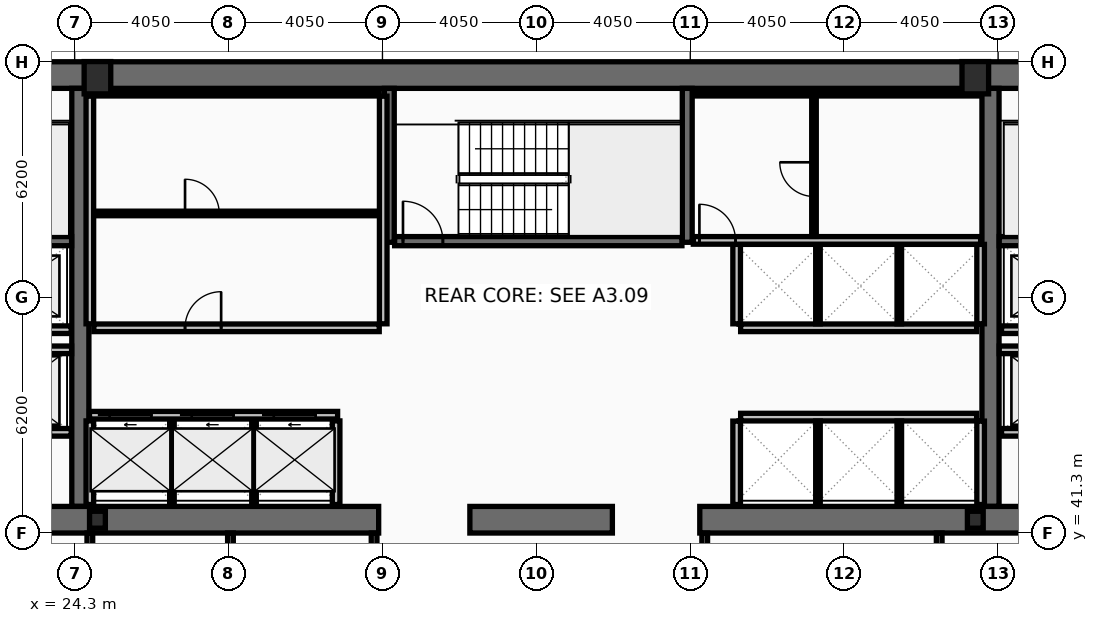
"""IFC4 building model, lengths in metres.
Left out: names, types, materials, properties, quantities, classifications, styles, units other than length and angle.
Written with IfcOpenShell. Run it as: python <this file> out.ifc"""

import sys

from ifc_helpers import new_model, si_unit, direction, frame, frame_2d, origin, origin_2d, place, context, subcontext, project, spatial, rectangle, hollow_rectangle, i_section, extrude, element, fill, save


model = new_model("IFC4")
c1 = context("Model", 3, precision=1e-05, world=origin(), true_north=direction((0.0, 1.0)))
c2 = subcontext(c1, "Body", "Model", "MODEL_VIEW")
j1 = project(units=[si_unit("LENGTHUNIT", "METRE"), si_unit("PLANEANGLEUNIT", "RADIAN")], contexts=[c1])
p1 = place(None, origin())
s1 = spatial("IfcSite", under=j1, at=p1, CompositionType="ELEMENT")
p2 = place(p1, origin())
s2 = spatial("IfcBuilding", under=s1, at=p2, CompositionType="ELEMENT")
p3 = place(p2, frame((0.0, 0.0, 132.6)))
s3 = spatial("IfcBuildingStorey", under=s2, at=p3, CompositionType="ELEMENT", Elevation=132.6)
p4 = place(p3, frame((16.2, 53.35, 0.0), z_axis=(0.0, 0.0, 1.0), x_axis=(1.0, 0.0, 0.0)))
e1 = element("IfcWall", 1, at=p4, inside=s3, PredefinedType="SHEAR", context=c2, shape_type="SweptSolid", body=[
    extrude(rectangle(XDim=40.5, YDim=0.7, at=frame_2d((20.25, 0.0))), origin(), (0.0, 0.0, 1.0), 3.44),
])
for number, where, z_axis, x_axis in (
    (2, (24.45, 42.0, 0.0), (0.0, 0.0, 1.0), (0.0, 1.0, 0.0)),
    (3, (48.4, 42.0, 0.0), (0.0, 0.0, 1.0), (0.0, 1.0, 0.0)),
):
    element("IfcWall", number, at=place(p3, frame(where, z_axis=z_axis, x_axis=x_axis)), inside=s3, PredefinedType="SHEAR", context=c2, shape_type="SweptSolid", body=[
        extrude(rectangle(XDim=11.0, YDim=0.45, at=frame_2d((5.5, 0.0))), origin(), (0.0, 0.0, 1.0), 3.44),
    ])
p5 = place(p3, frame((32.3, 41.65, 0.0), z_axis=(0.0, 0.0, 1.0), x_axis=(-1.0, 0.0, 0.0)))
e4 = element("IfcWall", 4, at=p5, inside=s3, PredefinedType="SHEAR", context=c2, shape_type="SweptSolid", body=[
    extrude(rectangle(XDim=11.45, YDim=0.7, at=frame_2d((5.725, 0.0))), origin(), (0.0, 0.0, 1.0), 3.44),
])
p6 = place(p3, frame((38.45, 41.65, 0.0), z_axis=(0.0, 0.0, 1.0), x_axis=(-1.0, 0.0, 0.0)))
e5 = element("IfcWall", 5, at=p6, inside=s3, PredefinedType="SHEAR", context=c2, shape_type="SweptSolid", body=[
    extrude(rectangle(XDim=3.75, YDim=0.7, at=frame_2d((1.875, 0.0))), origin(), (0.0, 0.0, 1.0), 3.44),
])
p7 = place(p3, frame((52.05, 41.65, 0.0), z_axis=(0.0, 0.0, 1.0), x_axis=(-1.0, 0.0, 0.0)))
e6 = element("IfcWall", 6, at=p7, inside=s3, PredefinedType="SHEAR", context=c2, shape_type="SweptSolid", body=[
    extrude(rectangle(XDim=11.3, YDim=0.7, at=frame_2d((5.65, 0.0))), origin(), (0.0, 0.0, 1.0), 3.44),
])
for number, where, z_axis, x_axis in (
    (7, (32.58, 48.95, 0.0), (0.0, 0.0, 1.0), (0.0, 1.0, 0.0)),
    (8, (40.42, 48.95, 0.0), (0.0, 0.0, 1.0), (0.0, 1.0, 0.0)),
):
    element("IfcWall", number, at=place(p3, frame(where, z_axis=z_axis, x_axis=x_axis)), inside=s3, PredefinedType="SHEAR", context=c2, shape_type="SweptSolid", body=[
        extrude(rectangle(XDim=4.05, YDim=0.26, at=frame_2d((2.025, 0.0))), origin(), (0.0, 0.0, 1.0), 3.44),
    ])
p8 = place(p3, frame((16.9, 48.98, 0.0), z_axis=(0.0, 0.0, 1.0), x_axis=(1.0, 0.0, 0.0)))
e9 = element("IfcWall", 9, at=p8, inside=s3, PredefinedType="SHEAR", context=c2, shape_type="SweptSolid", body=[
    extrude(rectangle(XDim=7.32, YDim=0.24, at=frame_2d((3.66, 0.0))), origin(), (0.0, 0.0, 1.0), 3.44),
])
p9 = place(p8, frame((0.22, 0.0, 0.0)))
e10 = element("IfcOpeningElement", 10, at=p9, cuts=e9, PredefinedType="OPENING", context=c2, shape_type="SweptSolid", body=[
    extrude(rectangle(XDim=1.05, YDim=2.15, at=frame_2d((0.525, 1.075))), frame((0.0, 0.13, 0.0), z_axis=(0.0, -1.0, 0.0), x_axis=(1.0, 0.0, 0.0)), (0.0, 0.0, 1.0), 0.26),
])
p10 = place(p3, frame((48.63, 48.98, 0.0), z_axis=(0.0, 0.0, 1.0), x_axis=(1.0, 0.0, 0.0)))
e11 = element("IfcWall", 11, at=p10, inside=s3, PredefinedType="SHEAR", context=c2, shape_type="SweptSolid", body=[
    extrude(rectangle(XDim=7.37, YDim=0.24, at=frame_2d((3.685, 0.0))), origin(), (0.0, 0.0, 1.0), 3.44),
])
p11 = place(p10, frame((6.1, 0.0, 0.0)))
e12 = element("IfcOpeningElement", 12, at=p11, cuts=e11, PredefinedType="OPENING", context=c2, shape_type="SweptSolid", body=[
    extrude(rectangle(XDim=1.05, YDim=2.15, at=frame_2d((0.525, 1.075))), frame((0.0, 0.13, 0.0), z_axis=(0.0, -1.0, 0.0), x_axis=(1.0, 0.0, 0.0)), (0.0, 0.0, 1.0), 0.26),
])
p12 = place(p3, frame((32.72, 48.98, 0.0), z_axis=(0.0, 0.0, 1.0), x_axis=(1.0, 0.0, 0.0)))
e13 = element("IfcWall", 13, at=p12, inside=s3, PredefinedType="SHEAR", context=c2, shape_type="SweptSolid", body=[
    extrude(rectangle(XDim=7.56, YDim=0.24, at=frame_2d((3.78, 0.0))), origin(), (0.0, 0.0, 1.0), 3.44),
])
p13 = place(p12, frame((0.22, 0.0, 0.0)))
e14 = element("IfcOpeningElement", 14, at=p13, cuts=e13, PredefinedType="OPENING", context=c2, shape_type="SweptSolid", body=[
    extrude(rectangle(XDim=1.05, YDim=2.15, at=frame_2d((0.525, 1.075))), frame((0.0, 0.13, 0.0), z_axis=(0.0, -1.0, 0.0), x_axis=(1.0, 0.0, 0.0)), (0.0, 0.0, 1.0), 0.26),
])
for number, where, z_axis, x_axis in (
    (15, (24.9, 53.28, 0.0), (0.0, 0.0, 1.0), (1.0, 0.0, 0.0)),
    (16, (48.0, 53.28, 0.0), (0.0, 0.0, 1.0), (1.0, 0.0, 0.0)),
):
    element("IfcColumn", number, at=place(p3, frame(where, z_axis=z_axis, x_axis=x_axis)), inside=s3, PredefinedType="COLUMN", context=c2, shape_type="SweptSolid", body=[
        extrude(hollow_rectangle(XDim=0.7, YDim=0.85, WallThickness=0.05, at=origin_2d()), origin(), (0.0, 0.0, 1.0), 3.6),
    ])
for number, where, z_axis, x_axis in (
    (17, (24.9, 41.65, 0.0), (0.0, 0.0, 1.0), (1.0, 0.0, 0.0)),
    (18, (48.0, 41.65, 0.0), (0.0, 0.0, 1.0), (1.0, 0.0, 0.0)),
):
    element("IfcColumn", number, at=place(p3, frame(where, z_axis=z_axis, x_axis=x_axis)), inside=s3, PredefinedType="COLUMN", context=c2, shape_type="SweptSolid", body=[
        extrude(i_section(OverallWidth=0.416, OverallDepth=0.446, WebThickness=0.039, FlangeThickness=0.063, at=origin_2d()), origin(), (0.0, 0.0, 1.0), 3.6),
    ])
p14 = place(p3, frame((24.69, 44.4, 0.0), z_axis=(0.0, 0.0, 1.0), x_axis=(1.0, 0.0, 0.0)))
e19 = element("IfcWall", 19, at=p14, inside=s3, PredefinedType="PARTITIONING", context=c2, shape_type="SweptSolid", body=[
    extrude(rectangle(XDim=6.53, YDim=0.2, at=frame_2d((3.265, 0.0))), origin(), (0.0, 0.0, 1.0), 3.44),
])
p15 = place(p14, frame((0.53, 0.0, 0.0)))
e20 = element("IfcOpeningElement", 20, at=p15, cuts=e19, PredefinedType="OPENING", context=c2, shape_type="SweptSolid", body=[
    extrude(rectangle(XDim=1.1, YDim=2.18, at=frame_2d((0.55, 1.09))), frame((0.0, 0.11, 0.0), z_axis=(0.0, -1.0, 0.0), x_axis=(1.0, 0.0, 0.0)), (0.0, 0.0, 1.0), 0.22),
])
p16 = place(p14, frame((2.69, 0.0, 0.0)))
e21 = element("IfcOpeningElement", 21, at=p16, cuts=e19, PredefinedType="OPENING", context=c2, shape_type="SweptSolid", body=[
    extrude(rectangle(XDim=1.1, YDim=2.18, at=frame_2d((0.55, 1.09))), frame((0.0, 0.11, 0.0), z_axis=(0.0, -1.0, 0.0), x_axis=(1.0, 0.0, 0.0)), (0.0, 0.0, 1.0), 0.22),
])
p17 = place(p14, frame((4.85, 0.0, 0.0)))
e22 = element("IfcOpeningElement", 22, at=p17, cuts=e19, PredefinedType="OPENING", context=c2, shape_type="SweptSolid", body=[
    extrude(rectangle(XDim=1.1, YDim=2.18, at=frame_2d((0.55, 1.09))), frame((0.0, 0.11, 0.0), z_axis=(0.0, -1.0, 0.0), x_axis=(1.0, 0.0, 0.0)), (0.0, 0.0, 1.0), 0.22),
])
p18 = place(p3, frame((51.61, 43.95, 0.0), z_axis=(0.0, 0.0, 1.0), x_axis=(-1.0, 0.0, 0.0)))
e23 = element("IfcWall", 23, at=p18, inside=s3, PredefinedType="PARTITIONING", context=c2, shape_type="SweptSolid", body=[
    extrude(rectangle(XDim=2.92, YDim=0.2, at=frame_2d((1.46, 0.0))), origin(), (0.0, 0.0, 1.0), 3.44),
])
p19 = place(p18, frame((0.81, 0.0, 0.0)))
e24 = element("IfcOpeningElement", 24, at=p19, cuts=e23, PredefinedType="OPENING", context=c2, shape_type="SweptSolid", body=[
    extrude(rectangle(XDim=1.3, YDim=2.18, at=frame_2d((0.65, 1.09))), frame((0.0, 0.11, 0.0), z_axis=(0.0, -1.0, 0.0), x_axis=(1.0, 0.0, 0.0)), (0.0, 0.0, 1.0), 0.22),
])
p20 = place(p3, frame((24.21, 43.95, 0.0), z_axis=(0.0, 0.0, 1.0), x_axis=(-1.0, 0.0, 0.0)))
e25 = element("IfcWall", 25, at=p20, inside=s3, PredefinedType="PARTITIONING", context=c2, shape_type="SweptSolid", body=[
    extrude(rectangle(XDim=2.97, YDim=0.2, at=frame_2d((1.485, 0.0))), origin(), (0.0, 0.0, 1.0), 3.44),
])
p21 = place(p20, frame((0.86, 0.0, 0.0)))
e26 = element("IfcOpeningElement", 26, at=p21, cuts=e25, PredefinedType="OPENING", context=c2, shape_type="SweptSolid", body=[
    extrude(rectangle(XDim=1.3, YDim=2.18, at=frame_2d((0.65, 1.09))), frame((0.0, 0.11, 0.0), z_axis=(0.0, -1.0, 0.0), x_axis=(1.0, 0.0, 0.0)), (0.0, 0.0, 1.0), 0.22),
])
p22 = place(p3, frame((51.61, 46.65, 0.0), z_axis=(0.0, 0.0, 1.0), x_axis=(-1.0, 0.0, 0.0)))
e27 = element("IfcWall", 27, at=p22, inside=s3, PredefinedType="PARTITIONING", context=c2, shape_type="SweptSolid", body=[
    extrude(rectangle(XDim=2.92, YDim=0.2, at=frame_2d((1.46, 0.0))), origin(), (0.0, 0.0, 1.0), 3.44),
])
p23 = place(p22, frame((0.86, 0.0, 0.0)))
e28 = element("IfcOpeningElement", 28, at=p23, cuts=e27, PredefinedType="OPENING", context=c2, shape_type="SweptSolid", body=[
    extrude(rectangle(XDim=1.2, YDim=2.18, at=frame_2d((0.6, 1.09))), frame((0.0, 0.11, 0.0), z_axis=(0.0, -1.0, 0.0), x_axis=(1.0, 0.0, 0.0)), (0.0, 0.0, 1.0), 0.22),
])
p24 = place(p3, frame((24.21, 46.65, 0.0), z_axis=(0.0, 0.0, 1.0), x_axis=(-1.0, 0.0, 0.0)))
e29 = element("IfcWall", 29, at=p24, inside=s3, PredefinedType="PARTITIONING", context=c2, shape_type="SweptSolid", body=[
    extrude(rectangle(XDim=2.97, YDim=0.2, at=frame_2d((1.485, 0.0))), origin(), (0.0, 0.0, 1.0), 3.44),
])
p25 = place(p24, frame((0.91, 0.0, 0.0)))
e30 = element("IfcOpeningElement", 30, at=p25, cuts=e29, PredefinedType="OPENING", context=c2, shape_type="SweptSolid", body=[
    extrude(rectangle(XDim=1.2, YDim=2.18, at=frame_2d((0.6, 1.09))), frame((0.0, 0.11, 0.0), z_axis=(0.0, -1.0, 0.0), x_axis=(1.0, 0.0, 0.0)), (0.0, 0.0, 1.0), 0.22),
])
p26 = place(p3, frame((21.2, 46.12, 0.0), z_axis=(0.0, 0.0, 1.0), x_axis=(1.0, 0.0, 0.0)))
e31 = element("IfcWall", 31, at=p26, inside=s3, PredefinedType="PARTITIONING", context=c2, shape_type="SweptSolid", body=[
    extrude(rectangle(XDim=3.02, YDim=0.2, at=frame_2d((1.51, 0.0))), origin(), (0.0, 0.0, 1.0), 3.44),
])
p27 = place(p3, frame((48.63, 46.12, 0.0), z_axis=(0.0, 0.0, 1.0), x_axis=(1.0, 0.0, 0.0)))
e32 = element("IfcWall", 32, at=p27, inside=s3, PredefinedType="PARTITIONING", context=c2, shape_type="SweptSolid", body=[
    extrude(rectangle(XDim=3.07, YDim=0.2, at=frame_2d((1.535, 0.0))), origin(), (0.0, 0.0, 1.0), 3.44),
])
for number, where, z_axis, x_axis in (
    (33, (24.7, 46.805, 0.0), (0.0, 0.0, 1.0), (0.0, 1.0, 0.0)),
    (34, (32.42, 46.805, 0.0), (0.0, 0.0, 1.0), (0.0, 1.0, 0.0)),
):
    element("IfcWall", number, at=place(p3, frame(where, z_axis=z_axis, x_axis=x_axis)), inside=s3, PredefinedType="PARTITIONING", context=c2, shape_type="SweptSolid", body=[
        extrude(rectangle(XDim=5.99, YDim=0.2, at=frame_2d((2.995, 0.0))), origin(), (0.0, 0.0, 1.0), 3.44),
    ])
p28 = place(p3, frame((24.805, 52.86, 0.0), z_axis=(0.0, 0.0, 1.0), x_axis=(1.0, 0.0, 0.0)))
e35 = element("IfcWall", 35, at=p28, inside=s3, PredefinedType="PARTITIONING", context=c2, shape_type="SweptSolid", body=[
    extrude(rectangle(XDim=7.51, YDim=0.12, at=frame_2d((3.755, 0.0))), origin(), (0.0, 0.0, 1.0), 3.44),
])
p29 = place(p3, frame((24.805, 49.709, 0.0), z_axis=(0.0, 0.0, 1.0), x_axis=(1.0, 0.0, 0.0)))
e36 = element("IfcWall", 36, at=p29, inside=s3, PredefinedType="PARTITIONING", context=c2, shape_type="SweptSolid", body=[
    extrude(rectangle(XDim=7.51, YDim=0.12, at=frame_2d((3.755, 0.0))), origin(), (0.0, 0.0, 1.0), 3.44),
])
p30 = place(p29, frame((2.4, 0.0, 0.0)))
e37 = element("IfcOpeningElement", 37, at=p30, cuts=e36, PredefinedType="OPENING", context=c2, shape_type="SweptSolid", body=[
    extrude(rectangle(XDim=0.9, YDim=2.05, at=frame_2d((0.45, 1.025))), frame((0.0, 0.07, 0.0), z_axis=(0.0, -1.0, 0.0), x_axis=(1.0, 0.0, 0.0)), (0.0, 0.0, 1.0), 0.14),
])
p31 = place(p3, frame((24.805, 46.7, 0.0), z_axis=(0.0, 0.0, 1.0), x_axis=(1.0, 0.0, 0.0)))
e38 = element("IfcWall", 38, at=p31, inside=s3, PredefinedType="PARTITIONING", context=c2, shape_type="SweptSolid", body=[
    extrude(rectangle(XDim=7.51, YDim=0.2, at=frame_2d((3.755, 0.0))), origin(), (0.0, 0.0, 1.0), 3.44),
])
p32 = place(p31, frame((2.4, 0.0, 0.0)))
e39 = element("IfcOpeningElement", 39, at=p32, cuts=e38, PredefinedType="OPENING", context=c2, shape_type="SweptSolid", body=[
    extrude(rectangle(XDim=0.95, YDim=2.1, at=frame_2d((0.475, 1.05))), frame((0.0, 0.11, 0.0), z_axis=(0.0, -1.0, 0.0), x_axis=(1.0, 0.0, 0.0)), (0.0, 0.0, 1.0), 0.22),
])
for number, where, z_axis, x_axis in (
    (40, (24.7, 42.05, 0.0), (0.0, 0.0, 1.0), (0.0, 1.0, 0.0)),
    (41, (31.18, 42.05, 0.0), (0.0, 0.0, 1.0), (0.0, 1.0, 0.0)),
):
    element("IfcWall", number, at=place(p3, frame(where, z_axis=z_axis, x_axis=x_axis)), inside=s3, PredefinedType="PARTITIONING", context=c2, shape_type="SweptSolid", body=[
        extrude(rectangle(XDim=2.2, YDim=0.2, at=frame_2d((1.1, 0.0))), origin(), (0.0, 0.0, 1.0), 3.44),
    ])
for number, where, z_axis, x_axis in (
    (42, (26.86, 42.05, 0.0), (0.0, 0.0, 1.0), (0.0, 1.0, 0.0)),
    (43, (29.02, 42.05, 0.0), (0.0, 0.0, 1.0), (0.0, 1.0, 0.0)),
):
    element("IfcWall", number, at=place(p3, frame(where, z_axis=z_axis, x_axis=x_axis)), inside=s3, PredefinedType="PARTITIONING", context=c2, shape_type="SweptSolid", body=[
        extrude(rectangle(XDim=2.2, YDim=0.12, at=frame_2d((1.1, 0.0))), origin(), (0.0, 0.0, 1.0), 3.44),
    ])
p33 = place(p3, frame((41.825, 46.7, 0.0), z_axis=(0.0, 0.0, 1.0), x_axis=(1.0, 0.0, 0.0)))
e44 = element("IfcWall", 44, at=p33, inside=s3, PredefinedType="PARTITIONING", context=c2, shape_type="SweptSolid", body=[
    extrude(rectangle(XDim=6.21, YDim=0.2, at=frame_2d((3.105, 0.0))), origin(), (0.0, 0.0, 1.0), 3.44),
])
for number, where, z_axis, x_axis in (
    (45, (41.72, 46.805, 0.0), (0.0, 0.0, 1.0), (0.0, 1.0, 0.0)),
    (46, (48.14, 46.805, 0.0), (0.0, 0.0, 1.0), (0.0, 1.0, 0.0)),
):
    element("IfcWall", number, at=place(p3, frame(where, z_axis=z_axis, x_axis=x_axis)), inside=s3, PredefinedType="PARTITIONING", context=c2, shape_type="SweptSolid", body=[
        extrude(rectangle(XDim=2.09, YDim=0.2, at=frame_2d((1.045, 0.0))), origin(), (0.0, 0.0, 1.0), 3.44),
    ])
for number, where, z_axis, x_axis in (
    (47, (43.86, 46.805, 0.0), (0.0, 0.0, 1.0), (0.0, 1.0, 0.0)),
    (48, (46.0, 46.805, 0.0), (0.0, 0.0, 1.0), (0.0, 1.0, 0.0)),
):
    element("IfcWall", number, at=place(p3, frame(where, z_axis=z_axis, x_axis=x_axis)), inside=s3, PredefinedType="PARTITIONING", context=c2, shape_type="SweptSolid", body=[
        extrude(rectangle(XDim=2.09, YDim=0.12, at=frame_2d((1.045, 0.0))), origin(), (0.0, 0.0, 1.0), 3.44),
    ])
p34 = place(p3, frame((41.825, 44.35, 0.0), z_axis=(0.0, 0.0, 1.0), x_axis=(1.0, 0.0, 0.0)))
e49 = element("IfcWall", 49, at=p34, inside=s3, PredefinedType="PARTITIONING", context=c2, shape_type="SweptSolid", body=[
    extrude(rectangle(XDim=6.21, YDim=0.2, at=frame_2d((3.105, 0.0))), origin(), (0.0, 0.0, 1.0), 3.44),
])
for number, where, z_axis, x_axis in (
    (50, (41.72, 42.05, 0.0), (0.0, 0.0, 1.0), (0.0, 1.0, 0.0)),
    (51, (48.14, 42.05, 0.0), (0.0, 0.0, 1.0), (0.0, 1.0, 0.0)),
):
    element("IfcWall", number, at=place(p3, frame(where, z_axis=z_axis, x_axis=x_axis)), inside=s3, PredefinedType="PARTITIONING", context=c2, shape_type="SweptSolid", body=[
        extrude(rectangle(XDim=2.195, YDim=0.2, at=frame_2d((1.098, 0.0))), origin(), (0.0, 0.0, 1.0), 3.44),
    ])
for number, where, z_axis, x_axis in (
    (52, (43.86, 42.05, 0.0), (0.0, 0.0, 1.0), (0.0, 1.0, 0.0)),
    (53, (46.0, 42.05, 0.0), (0.0, 0.0, 1.0), (0.0, 1.0, 0.0)),
):
    element("IfcWall", number, at=place(p3, frame(where, z_axis=z_axis, x_axis=x_axis)), inside=s3, PredefinedType="PARTITIONING", context=c2, shape_type="SweptSolid", body=[
        extrude(rectangle(XDim=2.195, YDim=0.12, at=frame_2d((1.098, 0.0))), origin(), (0.0, 0.0, 1.0), 3.44),
    ])
p35 = place(p3, frame((40.58, 52.86, 0.0), z_axis=(0.0, 0.0, 1.0), x_axis=(1.0, 0.0, 0.0)))
e54 = element("IfcWall", 54, at=p35, inside=s3, PredefinedType="PARTITIONING", context=c2, shape_type="SweptSolid", body=[
    extrude(rectangle(XDim=7.56, YDim=0.12, at=frame_2d((3.78, 0.0))), origin(), (0.0, 0.0, 1.0), 3.44),
])
p36 = place(p3, frame((40.58, 49.0, 0.0), z_axis=(0.0, 0.0, 1.0), x_axis=(1.0, 0.0, 0.0)))
e55 = element("IfcWall", 55, at=p36, inside=s3, PredefinedType="PARTITIONING", context=c2, shape_type="SweptSolid", body=[
    extrude(rectangle(XDim=7.56, YDim=0.2, at=frame_2d((3.78, 0.0))), origin(), (0.0, 0.0, 1.0), 3.44),
])
p37 = place(p36, frame((0.16, 0.0, 0.0)))
e56 = element("IfcOpeningElement", 56, at=p37, cuts=e55, PredefinedType="OPENING", context=c2, shape_type="SweptSolid", body=[
    extrude(rectangle(XDim=0.95, YDim=2.1, at=frame_2d((0.475, 1.05))), frame((0.0, 0.11, 0.0), z_axis=(0.0, -1.0, 0.0), x_axis=(1.0, 0.0, 0.0)), (0.0, 0.0, 1.0), 0.22),
])
p38 = place(p3, frame((43.755, 49.105, 0.0), z_axis=(0.0, 0.0, 1.0), x_axis=(0.0, 1.0, 0.0)))
e57 = element("IfcWall", 57, at=p38, inside=s3, PredefinedType="PARTITIONING", context=c2, shape_type="SweptSolid", body=[
    extrude(rectangle(XDim=3.69, YDim=0.12, at=frame_2d((1.845, 0.0))), origin(), (0.0, 0.0, 1.0), 3.44),
])
p39 = place(p38, frame((1.05, 0.0, 0.0)))
e58 = element("IfcOpeningElement", 58, at=p39, cuts=e57, PredefinedType="OPENING", context=c2, shape_type="SweptSolid", body=[
    extrude(rectangle(XDim=0.9, YDim=2.05, at=frame_2d((0.45, 1.025))), frame((0.0, 0.07, 0.0), z_axis=(0.0, -1.0, 0.0), x_axis=(1.0, 0.0, 0.0)), (0.0, 0.0, 1.0), 0.14),
])
p40 = place(p3, frame((24.7, 38.28, 0.0), z_axis=(0.0, 0.0, 1.0), x_axis=(0.0, 1.0, 0.0)))
e59 = element("IfcWall", 59, at=p40, inside=s3, PredefinedType="PARTITIONING", context=c2, shape_type="SweptSolid", body=[
    extrude(rectangle(XDim=3.02, YDim=0.15, at=frame_2d((1.51, 0.0))), origin(), (0.0, 0.0, 1.0), 2.73),
])
for number, where, z_axis, x_axis in (
    (60, (28.4, 38.28, 0.0), (0.0, 0.0, 1.0), (0.0, 1.0, 0.0)),
    (61, (32.18, 38.28, 0.0), (0.0, 0.0, 1.0), (0.0, 1.0, 0.0)),
    (62, (40.88, 38.28, 0.0), (0.0, 0.0, 1.0), (0.0, 1.0, 0.0)),
    (63, (47.05, 38.28, 0.0), (0.0, 0.0, 1.0), (0.0, 1.0, 0.0)),
):
    element("IfcWall", number, at=place(p3, frame(where, z_axis=z_axis, x_axis=x_axis)), inside=s3, PredefinedType="PARTITIONING", context=c2, shape_type="SweptSolid", body=[
        extrude(rectangle(XDim=3.02, YDim=0.15, at=frame_2d((1.51, 0.0))), origin(), (0.0, 0.0, 1.0), 3.44),
    ])
p41 = place(p13, origin())
e64 = element("IfcDoor", 64, at=p41, inside=s3, OperationType="SINGLE_SWING_LEFT", PredefinedType="DOOR", context=c2, shape_type="SweptSolid", body=[
    extrude(rectangle(XDim=1.05, YDim=2.15, at=frame_2d((0.525, 1.075))), frame((0.0, 0.025, 0.0), z_axis=(0.0, -1.0, 0.0), x_axis=(1.0, 0.0, 0.0)), (0.0, 0.0, 1.0), 0.05),
])
fill(e14, e64)
p42 = place(p15, origin())
e65 = element("IfcDoor", 65, at=p42, inside=s3, OperationType="SLIDING_TO_LEFT", PredefinedType="DOOR", context=c2, shape_type="SweptSolid", body=[
    extrude(rectangle(XDim=1.1, YDim=2.18, at=frame_2d((0.55, 1.09))), frame((0.0, 0.025, 0.0), z_axis=(0.0, -1.0, 0.0), x_axis=(1.0, 0.0, 0.0)), (0.0, 0.0, 1.0), 0.05),
])
fill(e20, e65)
p43 = place(p16, origin())
e66 = element("IfcDoor", 66, at=p43, inside=s3, OperationType="SLIDING_TO_LEFT", PredefinedType="DOOR", context=c2, shape_type="SweptSolid", body=[
    extrude(rectangle(XDim=1.1, YDim=2.18, at=frame_2d((0.55, 1.09))), frame((0.0, 0.025, 0.0), z_axis=(0.0, -1.0, 0.0), x_axis=(1.0, 0.0, 0.0)), (0.0, 0.0, 1.0), 0.05),
])
fill(e21, e66)
p44 = place(p17, origin())
e67 = element("IfcDoor", 67, at=p44, inside=s3, OperationType="SLIDING_TO_LEFT", PredefinedType="DOOR", context=c2, shape_type="SweptSolid", body=[
    extrude(rectangle(XDim=1.1, YDim=2.18, at=frame_2d((0.55, 1.09))), frame((0.0, 0.025, 0.0), z_axis=(0.0, -1.0, 0.0), x_axis=(1.0, 0.0, 0.0)), (0.0, 0.0, 1.0), 0.05),
])
fill(e22, e67)
p45 = place(p30, origin())
e68 = element("IfcDoor", 68, at=p45, inside=s3, OperationType="SINGLE_SWING_LEFT", PredefinedType="DOOR", context=c2, shape_type="SweptSolid", body=[
    extrude(rectangle(XDim=0.9, YDim=2.05, at=frame_2d((0.45, 1.025))), frame((0.0, 0.025, 0.0), z_axis=(0.0, -1.0, 0.0), x_axis=(1.0, 0.0, 0.0)), (0.0, 0.0, 1.0), 0.05),
])
fill(e37, e68)
p46 = place(p32, origin())
e69 = element("IfcDoor", 69, at=p46, inside=s3, OperationType="SINGLE_SWING_RIGHT", PredefinedType="DOOR", context=c2, shape_type="SweptSolid", body=[
    extrude(rectangle(XDim=0.95, YDim=2.1, at=frame_2d((0.475, 1.05))), frame((0.0, 0.025, 0.0), z_axis=(0.0, -1.0, 0.0), x_axis=(1.0, 0.0, 0.0)), (0.0, 0.0, 1.0), 0.05),
])
fill(e39, e69)
p47 = place(p37, origin())
e70 = element("IfcDoor", 70, at=p47, inside=s3, OperationType="SINGLE_SWING_LEFT", PredefinedType="DOOR", context=c2, shape_type="SweptSolid", body=[
    extrude(rectangle(XDim=0.95, YDim=2.1, at=frame_2d((0.475, 1.05))), frame((0.0, 0.025, 0.0), z_axis=(0.0, -1.0, 0.0), x_axis=(1.0, 0.0, 0.0)), (0.0, 0.0, 1.0), 0.05),
])
fill(e56, e70)
p48 = place(p39, origin())
e71 = element("IfcDoor", 71, at=p48, inside=s3, OperationType="SINGLE_SWING_RIGHT", PredefinedType="DOOR", context=c2, shape_type="SweptSolid", body=[
    extrude(rectangle(XDim=0.9, YDim=2.05, at=frame_2d((0.45, 1.025))), frame((0.0, 0.025, 0.0), z_axis=(0.0, -1.0, 0.0), x_axis=(1.0, 0.0, 0.0)), (0.0, 0.0, 1.0), 0.05),
])
fill(e58, e71)
save(model, sys.argv[1])
